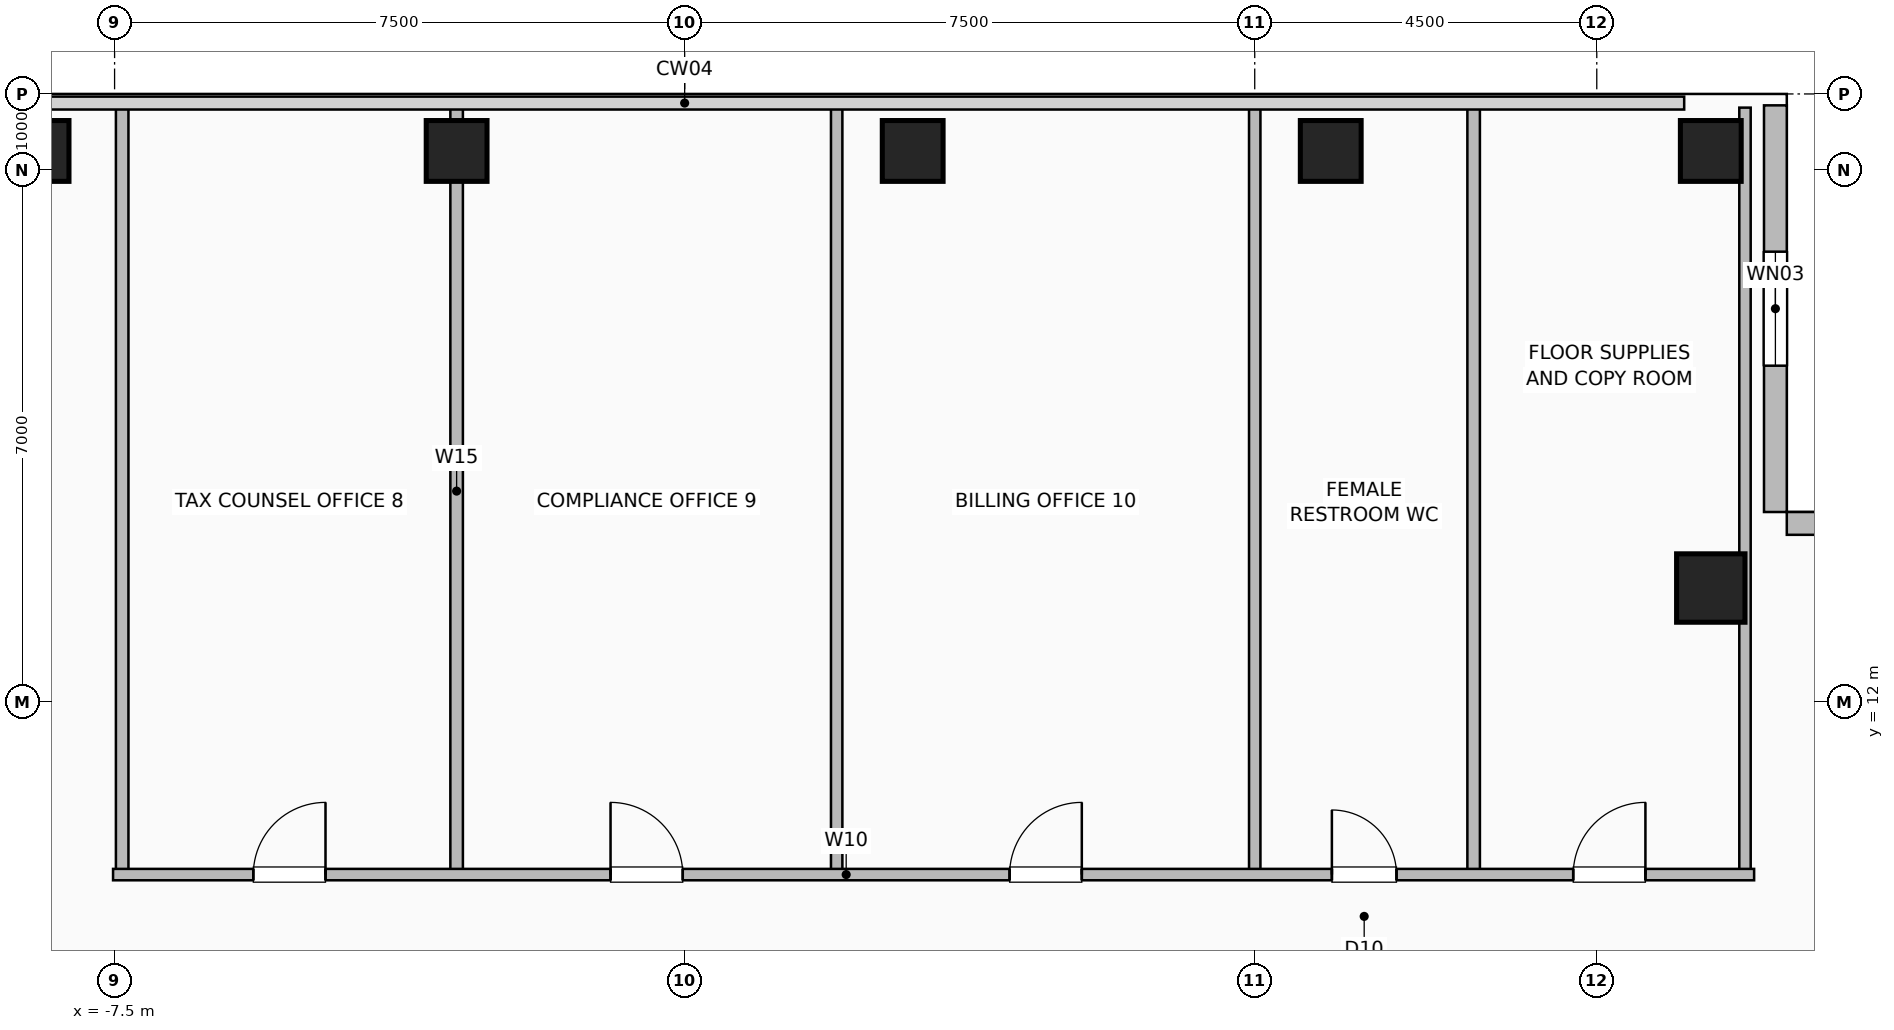
"""IFC4 building model, lengths in metres.
Left out: names, types, materials, properties, quantities, classifications, styles, units other than length and angle.
Written with IfcOpenShell. Run it as: python <this file> out.ifc"""

import sys

from ifc_helpers import new_model, si_unit, direction, frame, frame_2d, origin, origin_2d, place, context, subcontext, project, spatial, rectangle, hollow_rectangle, extrude, element, fill, save


model = new_model("IFC4")
c1 = context("Model", 3, precision=1e-05, world=origin(), true_north=direction((0.0, 1.0)))
c2 = subcontext(c1, "Body", "Model", "MODEL_VIEW")
j1 = project(units=[si_unit("LENGTHUNIT", "METRE"), si_unit("PLANEANGLEUNIT", "RADIAN")], contexts=[c1])
p1 = place(None, origin())
s1 = spatial("IfcSite", under=j1, at=p1, CompositionType="ELEMENT")
p2 = place(p1, origin())
s2 = spatial("IfcBuilding", under=s1, at=p2, CompositionType="ELEMENT")
p3 = place(p2, frame((0.0, 0.0, 177.0)))
s3 = spatial("IfcBuildingStorey", under=s2, at=p3, CompositionType="ELEMENT", Elevation=177.0)
for number, where, z_axis, x_axis in (
    (1, (-8.5, 19.25, 0.0), (0.0, 0.0, 1.0), (1.0, 0.0, 0.0)),
    (2, (-3.0, 19.25, 0.0), (0.0, 0.0, 1.0), (1.0, 0.0, 0.0)),
    (3, (3.0, 19.25, 0.0), (0.0, 0.0, 1.0), (1.0, 0.0, 0.0)),
    (4, (8.5, 19.25, 0.0), (0.0, 0.0, 1.0), (1.0, 0.0, 0.0)),
    (5, (13.5, 19.25, 0.0), (0.0, 0.0, 1.0), (1.0, 0.0, 0.0)),
):
    element("IfcColumn", number, at=place(p3, frame(where, z_axis=z_axis, x_axis=x_axis)), inside=s3, PredefinedType="COLUMN", context=c2, shape_type="SweptSolid", body=[
        extrude(hollow_rectangle(XDim=0.8, YDim=0.8, WallThickness=0.04, at=origin_2d()), origin(), (0.0, 0.0, 1.0), 3.6),
    ])
p4 = place(p3, frame((13.5, 13.5, 0.0), z_axis=(0.0, 0.0, 1.0), x_axis=(1.0, 0.0, 0.0)))
e6 = element("IfcColumn", 6, at=p4, inside=s3, PredefinedType="COLUMN", context=c2, shape_type="SweptSolid", body=[
    extrude(hollow_rectangle(XDim=0.9, YDim=0.9, WallThickness=0.045, at=origin_2d()), origin(), (0.0, 0.0, 1.0), 3.6),
])
p5 = place(p3, frame((14.35, 19.85, 0.0), z_axis=(0.0, 0.0, 1.0), x_axis=(0.0, -1.0, 0.0)))
e7 = element("IfcWall", 7, at=p5, inside=s3, PredefinedType="SOLIDWALL", context=c2, shape_type="SweptSolid", body=[
    extrude(rectangle(XDim=5.35, YDim=0.3, at=frame_2d((2.675, 0.0))), origin(), (0.0, 0.0, 1.0), 3.36),
])
p6 = place(p5, frame((1.925, 0.0, 0.9)))
e8 = element("IfcOpeningElement", 8, at=p6, cuts=e7, PredefinedType="OPENING", context=c2, shape_type="SweptSolid", body=[
    extrude(rectangle(XDim=1.5, YDim=1.8, at=frame_2d((0.75, 0.9))), frame((0.0, 0.16, 0.0), z_axis=(0.0, -1.0, 0.0), x_axis=(1.0, 0.0, 0.0)), (0.0, 0.0, 1.0), 0.32),
])
p7 = place(p3, frame((19.85, 14.35, 0.0), z_axis=(0.0, 0.0, 1.0), x_axis=(-1.0, 0.0, 0.0)))
e9 = element("IfcWall", 9, at=p7, inside=s3, PredefinedType="SOLIDWALL", context=c2, shape_type="SweptSolid", body=[
    extrude(rectangle(XDim=5.35, YDim=0.3, at=frame_2d((2.675, 0.0))), origin(), (0.0, 0.0, 1.0), 3.36),
])
for number, where, z_axis, x_axis in (
    (10, (10.38, 9.73, 0.0), (0.0, 0.0, 1.0), (0.0, 1.0, 0.0)),
    (11, (-7.4, 9.73, 0.0), (0.0, 0.0, 1.0), (0.0, 1.0, 0.0)),
):
    element("IfcWall", number, at=place(p3, frame(where, z_axis=z_axis, x_axis=x_axis)), inside=s3, PredefinedType="PLUMBINGWALL", context=c2, shape_type="SweptSolid", body=[
        extrude(rectangle(XDim=10.09, YDim=0.165, at=frame_2d((5.045, 0.0))), origin(), (0.0, 0.0, 1.0), 3.36),
    ])
p8 = place(p3, frame((-3.0, 9.73, 0.0), z_axis=(0.0, 0.0, 1.0), x_axis=(0.0, 1.0, 0.0)))
e12 = element("IfcWall", 12, at=p8, inside=s3, PredefinedType="PLUMBINGWALL", context=c2, shape_type="SweptSolid", body=[
    extrude(rectangle(XDim=10.09, YDim=0.165, at=frame_2d((5.045, 0.0))), origin(), (0.0, 0.0, 1.0), 2.792),
])
for number, where, z_axis, x_axis in (
    (13, (2.0, 9.73, 0.0), (0.0, 0.0, 1.0), (0.0, 1.0, 0.0)),
    (14, (7.5, 9.73, 0.0), (0.0, 0.0, 1.0), (0.0, 1.0, 0.0)),
    (15, (13.95, 9.73, 0.0), (0.0, 0.0, 1.0), (0.0, 1.0, 0.0)),
):
    element("IfcWall", number, at=place(p3, frame(where, z_axis=z_axis, x_axis=x_axis)), inside=s3, PredefinedType="PARTITIONING", context=c2, shape_type="SweptSolid", body=[
        extrude(rectangle(XDim=10.09, YDim=0.15, at=frame_2d((5.045, 0.0))), origin(), (0.0, 0.0, 1.0), 3.36),
    ])
p9 = place(p3, frame((-7.52, 9.73, 0.0), z_axis=(0.0, 0.0, 1.0), x_axis=(1.0, 0.0, 0.0)))
e16 = element("IfcWall", 16, at=p9, inside=s3, PredefinedType="PARTITIONING", context=c2, shape_type="SweptSolid", body=[
    extrude(rectangle(XDim=21.59, YDim=0.15, at=frame_2d((10.795, 0.0))), origin(), (0.0, 0.0, 1.0), 3.36),
])
p10 = place(p9, frame((1.845, 0.0, 0.0)))
e17 = element("IfcOpeningElement", 17, at=p10, cuts=e16, PredefinedType="OPENING", context=c2, shape_type="SweptSolid", body=[
    extrude(rectangle(XDim=0.95, YDim=2.06, at=frame_2d((0.475, 1.03))), frame((0.0, 0.085, 0.0), z_axis=(0.0, -1.0, 0.0), x_axis=(1.0, 0.0, 0.0)), (0.0, 0.0, 1.0), 0.17),
])
p11 = place(p9, frame((6.545, 0.0, 0.0)))
e18 = element("IfcOpeningElement", 18, at=p11, cuts=e16, PredefinedType="OPENING", context=c2, shape_type="SweptSolid", body=[
    extrude(rectangle(XDim=0.95, YDim=2.06, at=frame_2d((0.475, 1.03))), frame((0.0, 0.085, 0.0), z_axis=(0.0, -1.0, 0.0), x_axis=(1.0, 0.0, 0.0)), (0.0, 0.0, 1.0), 0.17),
])
p12 = place(p9, frame((11.795, 0.0, 0.0)))
e19 = element("IfcOpeningElement", 19, at=p12, cuts=e16, PredefinedType="OPENING", context=c2, shape_type="SweptSolid", body=[
    extrude(rectangle(XDim=0.95, YDim=2.06, at=frame_2d((0.475, 1.03))), frame((0.0, 0.085, 0.0), z_axis=(0.0, -1.0, 0.0), x_axis=(1.0, 0.0, 0.0)), (0.0, 0.0, 1.0), 0.17),
])
p13 = place(p9, frame((16.035, 0.0, 0.0)))
e20 = element("IfcOpeningElement", 20, at=p13, cuts=e16, PredefinedType="OPENING", context=c2, shape_type="SweptSolid", body=[
    extrude(rectangle(XDim=0.85, YDim=2.05, at=frame_2d((0.425, 1.025))), frame((0.0, 0.085, 0.0), z_axis=(0.0, -1.0, 0.0), x_axis=(1.0, 0.0, 0.0)), (0.0, 0.0, 1.0), 0.17),
])
p14 = place(p9, frame((19.21, 0.0, 0.0)))
e21 = element("IfcOpeningElement", 21, at=p14, cuts=e16, PredefinedType="OPENING", context=c2, shape_type="SweptSolid", body=[
    extrude(rectangle(XDim=0.95, YDim=2.06, at=frame_2d((0.475, 1.03))), frame((0.0, 0.085, 0.0), z_axis=(0.0, -1.0, 0.0), x_axis=(1.0, 0.0, 0.0)), (0.0, 0.0, 1.0), 0.17),
])
p15 = place(p6, origin())
e22 = element("IfcWindow", 22, at=p15, inside=s3, PartitioningType="SINGLE_PANEL", PredefinedType="WINDOW", context=c2, shape_type="SweptSolid", body=[
    extrude(rectangle(XDim=1.5, YDim=1.8, at=frame_2d((0.75, 0.9))), frame((0.0, 0.03, 0.0), z_axis=(0.0, -1.0, 0.0), x_axis=(1.0, 0.0, 0.0)), (0.0, 0.0, 1.0), 0.06),
])
fill(e8, e22)
p16 = place(p10, origin())
e23 = element("IfcDoor", 23, at=p16, inside=s3, OperationType="SINGLE_SWING_RIGHT", PredefinedType="DOOR", context=c2, shape_type="SweptSolid", body=[
    extrude(rectangle(XDim=0.95, YDim=2.06, at=frame_2d((0.475, 1.03))), frame((0.0, 0.025, 0.0), z_axis=(0.0, -1.0, 0.0), x_axis=(1.0, 0.0, 0.0)), (0.0, 0.0, 1.0), 0.05),
])
fill(e17, e23)
p17 = place(p11, origin())
e24 = element("IfcDoor", 24, at=p17, inside=s3, OperationType="SINGLE_SWING_LEFT", PredefinedType="DOOR", context=c2, shape_type="SweptSolid", body=[
    extrude(rectangle(XDim=0.95, YDim=2.06, at=frame_2d((0.475, 1.03))), frame((0.0, 0.025, 0.0), z_axis=(0.0, -1.0, 0.0), x_axis=(1.0, 0.0, 0.0)), (0.0, 0.0, 1.0), 0.05),
])
fill(e18, e24)
p18 = place(p12, origin())
e25 = element("IfcDoor", 25, at=p18, inside=s3, OperationType="SINGLE_SWING_RIGHT", PredefinedType="DOOR", context=c2, shape_type="SweptSolid", body=[
    extrude(rectangle(XDim=0.95, YDim=2.06, at=frame_2d((0.475, 1.03))), frame((0.0, 0.025, 0.0), z_axis=(0.0, -1.0, 0.0), x_axis=(1.0, 0.0, 0.0)), (0.0, 0.0, 1.0), 0.05),
])
fill(e19, e25)
p19 = place(p13, origin())
e26 = element("IfcDoor", 26, at=p19, inside=s3, OperationType="SINGLE_SWING_LEFT", PredefinedType="DOOR", context=c2, shape_type="SweptSolid", body=[
    extrude(rectangle(XDim=0.85, YDim=2.05, at=frame_2d((0.425, 1.025))), frame((0.0, 0.025, 0.0), z_axis=(0.0, -1.0, 0.0), x_axis=(1.0, 0.0, 0.0)), (0.0, 0.0, 1.0), 0.05),
])
fill(e20, e26)
p20 = place(p14, origin())
e27 = element("IfcDoor", 27, at=p20, inside=s3, OperationType="SINGLE_SWING_RIGHT", PredefinedType="DOOR", context=c2, shape_type="SweptSolid", body=[
    extrude(rectangle(XDim=0.95, YDim=2.06, at=frame_2d((0.475, 1.03))), frame((0.0, 0.025, 0.0), z_axis=(0.0, -1.0, 0.0), x_axis=(1.0, 0.0, 0.0)), (0.0, 0.0, 1.0), 0.05),
])
fill(e21, e27)
save(model, sys.argv[1])
